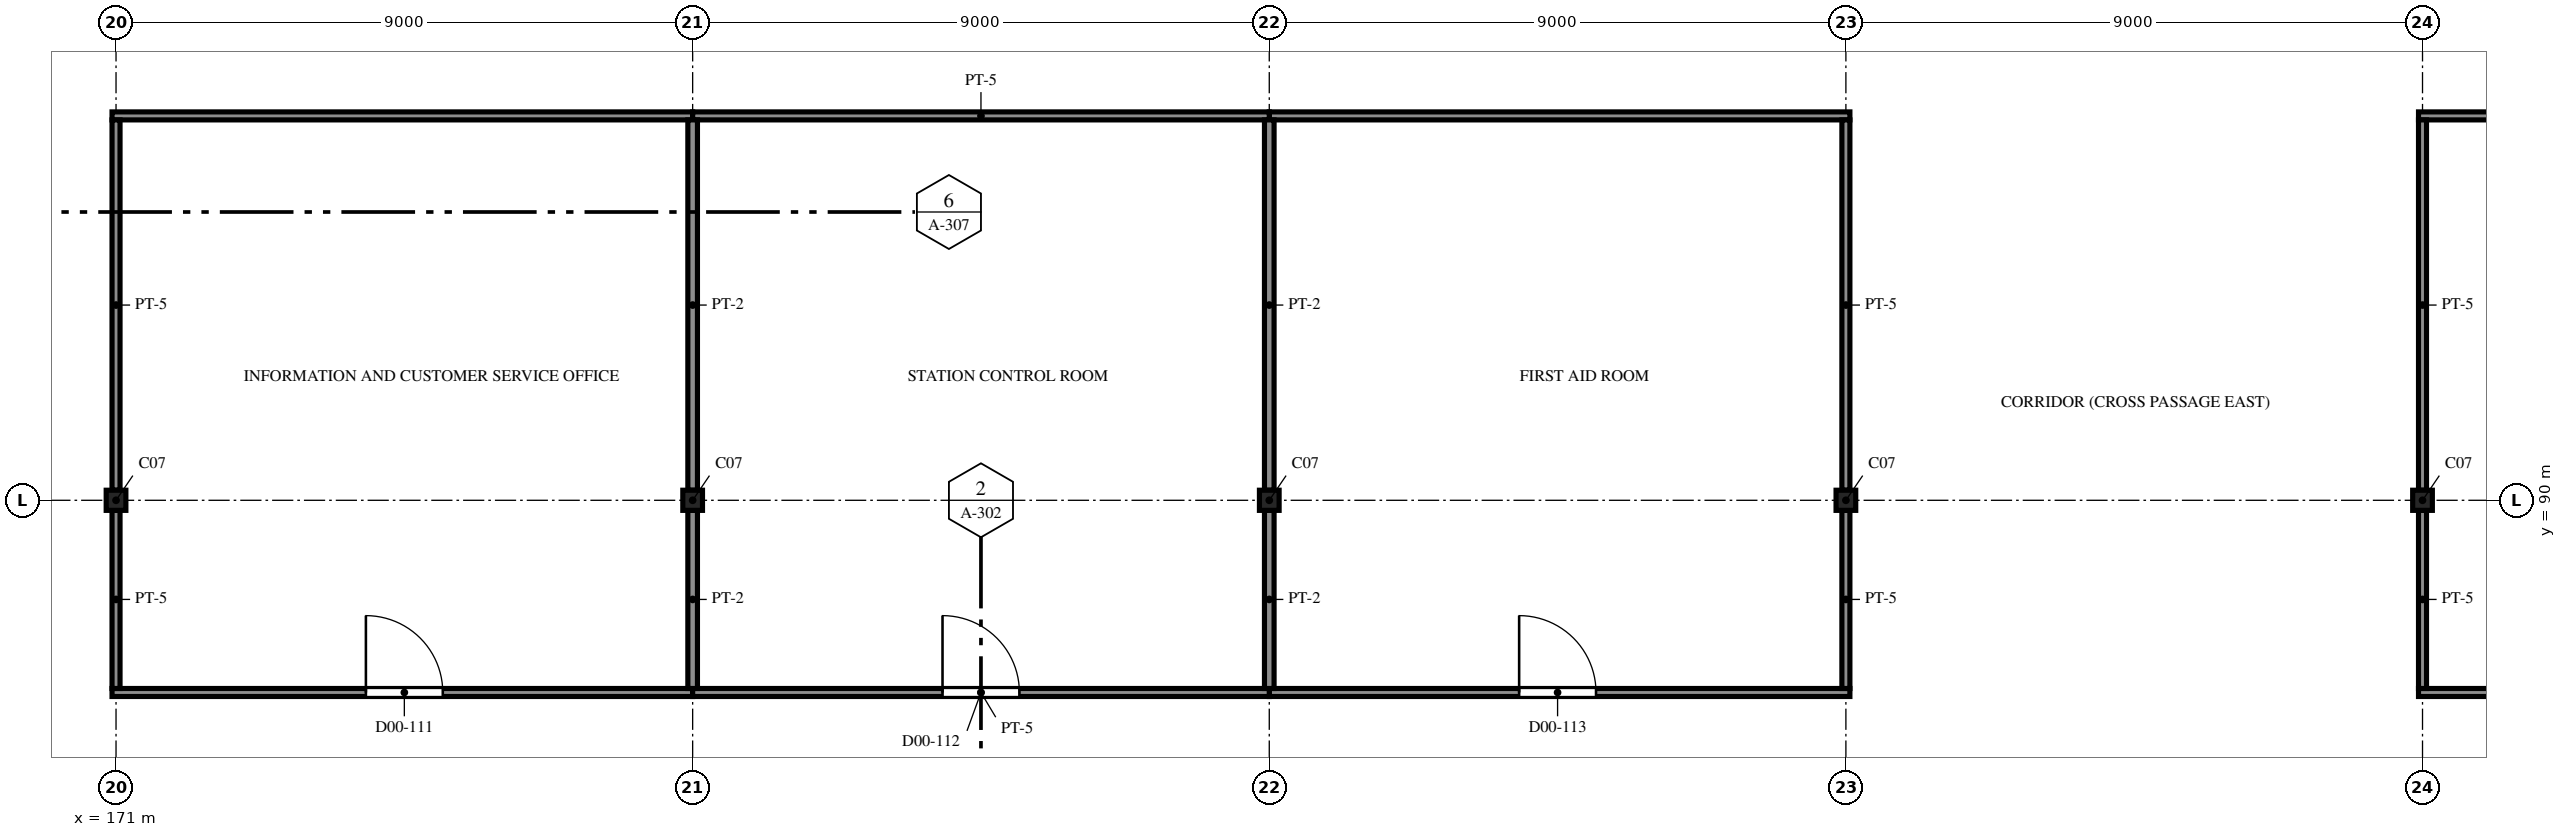
"""IFC4 building model, lengths in metres.
Left out: names, types, materials, properties, quantities, classifications, styles, units other than length and angle.
Written with IfcOpenShell. Run it as: python <this file> out.ifc"""

import sys

from ifc_helpers import new_model, si_unit, direction, frame, frame_2d, origin, origin_2d, place, context, subcontext, project, spatial, polyline, rectangle, i_section, outline, extrude, element, fill, save


model = new_model("IFC4")
c1 = context("Model", 3, precision=1e-05, world=origin(), true_north=direction((0.0, 1.0)))
c2 = subcontext(c1, "Body", "Model", "MODEL_VIEW")
j1 = project(units=[si_unit("LENGTHUNIT", "METRE"), si_unit("PLANEANGLEUNIT", "RADIAN")], contexts=[c1])
p1 = place(None, origin())
s1 = spatial("IfcSite", under=j1, at=p1, CompositionType="ELEMENT")
p2 = place(p1, origin())
s2 = spatial("IfcBuilding", under=s1, at=p2, CompositionType="ELEMENT")
p3 = place(p2, origin())
s3 = spatial("IfcBuildingStorey", under=s2, at=p3, CompositionType="ELEMENT", Elevation=0.0)
for number, where, z_axis, x_axis in (
    (1, (171.0, 90.0, -2.1), (0.0, 0.0, 1.0), (1.0, 0.0, 0.0)),
    (2, (180.0, 90.0, -2.1), (0.0, 0.0, 1.0), (1.0, 0.0, 0.0)),
    (3, (189.0, 90.0, -2.1), (0.0, 0.0, 1.0), (1.0, 0.0, 0.0)),
    (4, (198.0, 90.0, -2.1), (0.0, 0.0, 1.0), (1.0, 0.0, 0.0)),
    (5, (207.0, 90.0, -2.1), (0.0, 0.0, 1.0), (1.0, 0.0, 0.0)),
):
    element("IfcColumn", number, at=place(p3, frame(where, z_axis=z_axis, x_axis=x_axis)), inside=s3, PredefinedType="COLUMN", context=c2, shape_type="SweptSolid", body=[
        extrude(i_section(OverallWidth=0.307, OverallDepth=0.314, WebThickness=0.012, FlangeThickness=0.019, FilletRadius=0.015, at=origin_2d()), origin(), (0.0, 0.0, 1.0), 9.6),
    ])
for number, where, z_axis, x_axis in (
    (6, (180.0, 96.0, 0.0), (0.0, 0.0, 1.0), (-1.0, 0.0, 0.0)),
    (7, (216.0, 96.0, 0.0), (0.0, 0.0, 1.0), (-1.0, 0.0, 0.0)),
    (8, (198.062, 96.0, 0.0), (0.0, 0.0, 1.0), (-1.0, 0.0, 0.0)),
):
    element("IfcWall", number, at=place(p3, frame(where, z_axis=z_axis, x_axis=x_axis)), inside=s3, PredefinedType="PARTITIONING", context=c2, shape_type="SweptSolid", body=[
        extrude(rectangle(XDim=9.062, YDim=0.125, at=frame_2d((4.531, 0.0))), origin(), (0.0, 0.0, 1.0), 6.757),
    ])
p4 = place(p3, frame((189.0, 96.0, 0.0), z_axis=(0.0, 0.0, 1.0), x_axis=(-1.0, 0.0, 0.0)))
e9 = element("IfcWall", 9, at=p4, inside=s3, PredefinedType="PARTITIONING", context=c2, shape_type="SweptSolid", body=[
    extrude(rectangle(XDim=9.0, YDim=0.125, at=frame_2d((4.5, 0.0))), origin(), (0.0, 0.0, 1.0), 6.757),
])
p5 = place(p3, frame((170.938, 87.0, 0.0), z_axis=(0.0, 0.0, 1.0), x_axis=(1.0, 0.0, 0.0)))
e10 = element("IfcWall", 10, at=p5, inside=s3, PredefinedType="PARTITIONING", context=c2, shape_type="SweptSolid", body=[
    extrude(rectangle(XDim=9.062, YDim=0.125, at=frame_2d((4.531, 0.0))), origin(), (0.0, 0.0, 1.0), 6.757),
])
p6 = place(p5, frame((3.962, 0.0, 0.0)))
e11 = element("IfcOpeningElement", 11, at=p6, cuts=e10, PredefinedType="OPENING", context=c2, shape_type="SweptSolid", body=[
    extrude(rectangle(XDim=1.2, YDim=2.1, at=frame_2d((0.6, 1.05))), frame((0.0, 0.073, 0.0), z_axis=(0.0, -1.0, 0.0), x_axis=(1.0, 0.0, 0.0)), (0.0, 0.0, 1.0), 0.145),
])
p7 = place(p3, frame((206.938, 87.0, 0.0), z_axis=(0.0, 0.0, 1.0), x_axis=(1.0, 0.0, 0.0)))
e12 = element("IfcWall", 12, at=p7, inside=s3, PredefinedType="PARTITIONING", context=c2, shape_type="SweptSolid", body=[
    extrude(rectangle(XDim=9.062, YDim=0.125, at=frame_2d((4.531, 0.0))), origin(), (0.0, 0.0, 1.0), 6.757),
])
p8 = place(p7, frame((3.962, 0.0, 0.0)))
e13 = element("IfcOpeningElement", 13, at=p8, cuts=e12, PredefinedType="OPENING", context=c2, shape_type="SweptSolid", body=[
    extrude(rectangle(XDim=1.2, YDim=2.1, at=frame_2d((0.6, 1.05))), frame((0.0, 0.073, 0.0), z_axis=(0.0, -1.0, 0.0), x_axis=(1.0, 0.0, 0.0)), (0.0, 0.0, 1.0), 0.145),
])
p9 = place(p3, frame((189.0, 87.0, 0.0), z_axis=(0.0, 0.0, 1.0), x_axis=(1.0, 0.0, 0.0)))
e14 = element("IfcWall", 14, at=p9, inside=s3, PredefinedType="PARTITIONING", context=c2, shape_type="SweptSolid", body=[
    extrude(rectangle(XDim=9.062, YDim=0.125, at=frame_2d((4.531, 0.0))), origin(), (0.0, 0.0, 1.0), 6.757),
])
p10 = place(p9, frame((3.9, 0.0, 0.0)))
e15 = element("IfcOpeningElement", 15, at=p10, cuts=e14, PredefinedType="OPENING", context=c2, shape_type="SweptSolid", body=[
    extrude(rectangle(XDim=1.2, YDim=2.1, at=frame_2d((0.6, 1.05))), frame((0.0, 0.073, 0.0), z_axis=(0.0, -1.0, 0.0), x_axis=(1.0, 0.0, 0.0)), (0.0, 0.0, 1.0), 0.145),
])
p11 = place(p3, frame((180.0, 87.0, 0.0), z_axis=(0.0, 0.0, 1.0), x_axis=(1.0, 0.0, 0.0)))
e16 = element("IfcWall", 16, at=p11, inside=s3, PredefinedType="PARTITIONING", context=c2, shape_type="SweptSolid", body=[
    extrude(rectangle(XDim=9.0, YDim=0.125, at=frame_2d((4.5, 0.0))), origin(), (0.0, 0.0, 1.0), 6.757),
])
p12 = place(p11, frame((3.9, 0.0, 0.0)))
e17 = element("IfcOpeningElement", 17, at=p12, cuts=e16, PredefinedType="OPENING", context=c2, shape_type="SweptSolid", body=[
    extrude(rectangle(XDim=1.2, YDim=2.1, at=frame_2d((0.6, 1.05))), frame((0.0, 0.073, 0.0), z_axis=(0.0, -1.0, 0.0), x_axis=(1.0, 0.0, 0.0)), (0.0, 0.0, 1.0), 0.145),
])
p13 = place(p3, frame((207.0, 95.938, 0.0), z_axis=(0.0, 0.0, 1.0), x_axis=(0.0, -1.0, 0.0)))
e18 = element("IfcWall", 18, at=p13, inside=s3, PredefinedType="PARTITIONING", context=c2, shape_type="SweptSolid", body=[
    extrude(rectangle(XDim=5.78, YDim=0.125, at=frame_2d((2.89, 0.0))), origin(), (0.0, 0.0, 1.0), 6.757),
])
for number, where, z_axis, x_axis in (
    (19, (207.0, 89.843, 0.0), (0.0, 0.0, 1.0), (0.0, -1.0, 0.0)),
    (20, (198.0, 87.062, 0.0), (0.0, 0.0, 1.0), (0.0, 1.0, 0.0)),
):
    element("IfcWall", number, at=place(p3, frame(where, z_axis=z_axis, x_axis=x_axis)), inside=s3, PredefinedType="PARTITIONING", context=c2, shape_type="SweptSolid", body=[
        extrude(rectangle(XDim=2.78, YDim=0.125, at=frame_2d((1.39, 0.0))), origin(), (0.0, 0.0, 1.0), 6.757),
    ])
for number, where, z_axis, x_axis in (
    (21, (198.0, 90.157, 0.0), (0.0, 0.0, 1.0), (0.0, 1.0, 0.0)),
    (22, (171.0, 95.938, 0.0), (0.0, 0.0, 1.0), (0.0, -1.0, 0.0)),
):
    element("IfcWall", number, at=place(p3, frame(where, z_axis=z_axis, x_axis=x_axis)), inside=s3, PredefinedType="PARTITIONING", context=c2, shape_type="SweptSolid", body=[
        extrude(rectangle(XDim=5.78, YDim=0.125, at=frame_2d((2.89, 0.0))), origin(), (0.0, 0.0, 1.0), 6.757),
    ])
p14 = place(p3, frame((171.0, 89.843, 0.0), z_axis=(0.0, 0.0, 1.0), x_axis=(0.0, -1.0, 0.0)))
e23 = element("IfcWall", 23, at=p14, inside=s3, PredefinedType="PARTITIONING", context=c2, shape_type="SweptSolid", body=[
    extrude(rectangle(XDim=2.78, YDim=0.125, at=frame_2d((1.39, 0.0))), origin(), (0.0, 0.0, 1.0), 6.757),
])
p15 = place(p3, frame((180.0, 95.938, 0.0), z_axis=(0.0, 0.0, 1.0), x_axis=(0.0, -1.0, 0.0)))
e24 = element("IfcWall", 24, at=p15, inside=s3, PredefinedType="PARTITIONING", context=c2, shape_type="SweptSolid", body=[
    extrude(rectangle(XDim=5.78, YDim=0.15, at=frame_2d((2.89, 0.0))), origin(), (0.0, 0.0, 1.0), 6.6),
])
p16 = place(p3, frame((180.0, 89.843, 0.0), z_axis=(0.0, 0.0, 1.0), x_axis=(0.0, -1.0, 0.0)))
e25 = element("IfcWall", 25, at=p16, inside=s3, PredefinedType="PARTITIONING", context=c2, shape_type="SweptSolid", body=[
    extrude(rectangle(XDim=2.78, YDim=0.15, at=frame_2d((1.39, 0.0))), origin(), (0.0, 0.0, 1.0), 6.6),
])
p17 = place(p3, frame((189.0, 95.938, 0.0), z_axis=(0.0, 0.0, 1.0), x_axis=(0.0, -1.0, 0.0)))
e26 = element("IfcWall", 26, at=p17, inside=s3, PredefinedType="PARTITIONING", context=c2, shape_type="SweptSolid", body=[
    extrude(rectangle(XDim=5.78, YDim=0.15, at=frame_2d((2.89, 0.0))), origin(), (0.0, 0.0, 1.0), 6.6),
])
p18 = place(p3, frame((189.0, 89.843, 0.0), z_axis=(0.0, 0.0, 1.0), x_axis=(0.0, -1.0, 0.0)))
e27 = element("IfcWall", 27, at=p18, inside=s3, PredefinedType="PARTITIONING", context=c2, shape_type="SweptSolid", body=[
    extrude(rectangle(XDim=2.78, YDim=0.15, at=frame_2d((1.39, 0.0))), origin(), (0.0, 0.0, 1.0), 6.6),
])
p19 = place(p6, origin())
e28 = element("IfcDoor", 28, at=p19, inside=s3, OperationType="DOUBLE_DOOR_SINGLE_SWING", PredefinedType="DOOR", context=c2, shape_type="SweptSolid", body=[
    extrude(outline(polyline([(0.0, 0.0), (0.07, 0.0), (0.07, 2.03), (1.13, 2.03), (1.13, 0.0), (1.2, 0.0), (1.2, 2.1), (0.0, 2.1), (0.0, 0.0)])), frame((0.0, 0.025, 0.0), z_axis=(0.0, -1.0, 0.0), x_axis=(1.0, 0.0, 0.0)), (0.0, 0.0, 1.0), 0.05),
    extrude(outline(polyline([(0.074, 0.01), (0.597, 0.01), (0.597, 2.026), (0.074, 2.026), (0.074, 0.01)]), holes=[polyline([(0.178, 0.373), (0.492, 0.373), (0.492, 1.784), (0.178, 1.784), (0.178, 0.373)])]), frame((0.0, 0.017, 0.0), z_axis=(0.0, -1.0, 0.0), x_axis=(1.0, 0.0, 0.0)), (0.0, 0.0, 1.0), 0.035),
    extrude(rectangle(XDim=0.314, YDim=1.411, at=frame_2d((0.335, 1.079))), frame((0.0, 0.009, 0.0), z_axis=(0.0, -1.0, 0.0), x_axis=(1.0, 0.0, 0.0)), (0.0, 0.0, 1.0), 0.017),
    extrude(outline(polyline([(0.603, 0.01), (1.126, 0.01), (1.126, 2.026), (0.603, 2.026), (0.603, 0.01)]), holes=[polyline([(0.708, 0.373), (1.021, 0.373), (1.021, 1.784), (0.708, 1.784), (0.708, 0.373)])]), frame((0.0, 0.017, 0.0), z_axis=(0.0, -1.0, 0.0), x_axis=(1.0, 0.0, 0.0)), (0.0, 0.0, 1.0), 0.035),
    extrude(rectangle(XDim=0.314, YDim=1.411, at=frame_2d((0.865, 1.079))), frame((0.0, 0.009, 0.0), z_axis=(0.0, -1.0, 0.0), x_axis=(1.0, 0.0, 0.0)), (0.0, 0.0, 1.0), 0.017),
])
fill(e11, e28)
p20 = place(p12, origin())
e29 = element("IfcDoor", 29, at=p20, inside=s3, OperationType="DOUBLE_DOOR_SINGLE_SWING", PredefinedType="DOOR", context=c2, shape_type="SweptSolid", body=[
    extrude(outline(polyline([(0.0, 0.0), (0.07, 0.0), (0.07, 2.03), (1.13, 2.03), (1.13, 0.0), (1.2, 0.0), (1.2, 2.1), (0.0, 2.1), (0.0, 0.0)])), frame((0.0, 0.025, 0.0), z_axis=(0.0, -1.0, 0.0), x_axis=(1.0, 0.0, 0.0)), (0.0, 0.0, 1.0), 0.05),
    extrude(outline(polyline([(0.074, 0.01), (0.597, 0.01), (0.597, 2.026), (0.074, 2.026), (0.074, 0.01)]), holes=[polyline([(0.178, 0.373), (0.492, 0.373), (0.492, 1.784), (0.178, 1.784), (0.178, 0.373)])]), frame((0.0, 0.017, 0.0), z_axis=(0.0, -1.0, 0.0), x_axis=(1.0, 0.0, 0.0)), (0.0, 0.0, 1.0), 0.035),
    extrude(rectangle(XDim=0.314, YDim=1.411, at=frame_2d((0.335, 1.079))), frame((0.0, 0.009, 0.0), z_axis=(0.0, -1.0, 0.0), x_axis=(1.0, 0.0, 0.0)), (0.0, 0.0, 1.0), 0.017),
    extrude(outline(polyline([(0.603, 0.01), (1.126, 0.01), (1.126, 2.026), (0.603, 2.026), (0.603, 0.01)]), holes=[polyline([(0.708, 0.373), (1.021, 0.373), (1.021, 1.784), (0.708, 1.784), (0.708, 0.373)])]), frame((0.0, 0.017, 0.0), z_axis=(0.0, -1.0, 0.0), x_axis=(1.0, 0.0, 0.0)), (0.0, 0.0, 1.0), 0.035),
    extrude(rectangle(XDim=0.314, YDim=1.411, at=frame_2d((0.865, 1.079))), frame((0.0, 0.009, 0.0), z_axis=(0.0, -1.0, 0.0), x_axis=(1.0, 0.0, 0.0)), (0.0, 0.0, 1.0), 0.017),
])
fill(e17, e29)
p21 = place(p10, origin())
e30 = element("IfcDoor", 30, at=p21, inside=s3, OperationType="DOUBLE_DOOR_SINGLE_SWING", PredefinedType="DOOR", context=c2, shape_type="SweptSolid", body=[
    extrude(outline(polyline([(0.0, 0.0), (0.07, 0.0), (0.07, 2.03), (1.13, 2.03), (1.13, 0.0), (1.2, 0.0), (1.2, 2.1), (0.0, 2.1), (0.0, 0.0)])), frame((0.0, 0.025, 0.0), z_axis=(0.0, -1.0, 0.0), x_axis=(1.0, 0.0, 0.0)), (0.0, 0.0, 1.0), 0.05),
    extrude(outline(polyline([(0.074, 0.01), (0.597, 0.01), (0.597, 2.026), (0.074, 2.026), (0.074, 0.01)]), holes=[polyline([(0.178, 0.373), (0.492, 0.373), (0.492, 1.784), (0.178, 1.784), (0.178, 0.373)])]), frame((0.0, 0.017, 0.0), z_axis=(0.0, -1.0, 0.0), x_axis=(1.0, 0.0, 0.0)), (0.0, 0.0, 1.0), 0.035),
    extrude(rectangle(XDim=0.314, YDim=1.411, at=frame_2d((0.335, 1.079))), frame((0.0, 0.009, 0.0), z_axis=(0.0, -1.0, 0.0), x_axis=(1.0, 0.0, 0.0)), (0.0, 0.0, 1.0), 0.017),
    extrude(outline(polyline([(0.603, 0.01), (1.126, 0.01), (1.126, 2.026), (0.603, 2.026), (0.603, 0.01)]), holes=[polyline([(0.708, 0.373), (1.021, 0.373), (1.021, 1.784), (0.708, 1.784), (0.708, 0.373)])]), frame((0.0, 0.017, 0.0), z_axis=(0.0, -1.0, 0.0), x_axis=(1.0, 0.0, 0.0)), (0.0, 0.0, 1.0), 0.035),
    extrude(rectangle(XDim=0.314, YDim=1.411, at=frame_2d((0.865, 1.079))), frame((0.0, 0.009, 0.0), z_axis=(0.0, -1.0, 0.0), x_axis=(1.0, 0.0, 0.0)), (0.0, 0.0, 1.0), 0.017),
])
fill(e15, e30)
save(model, sys.argv[1])
